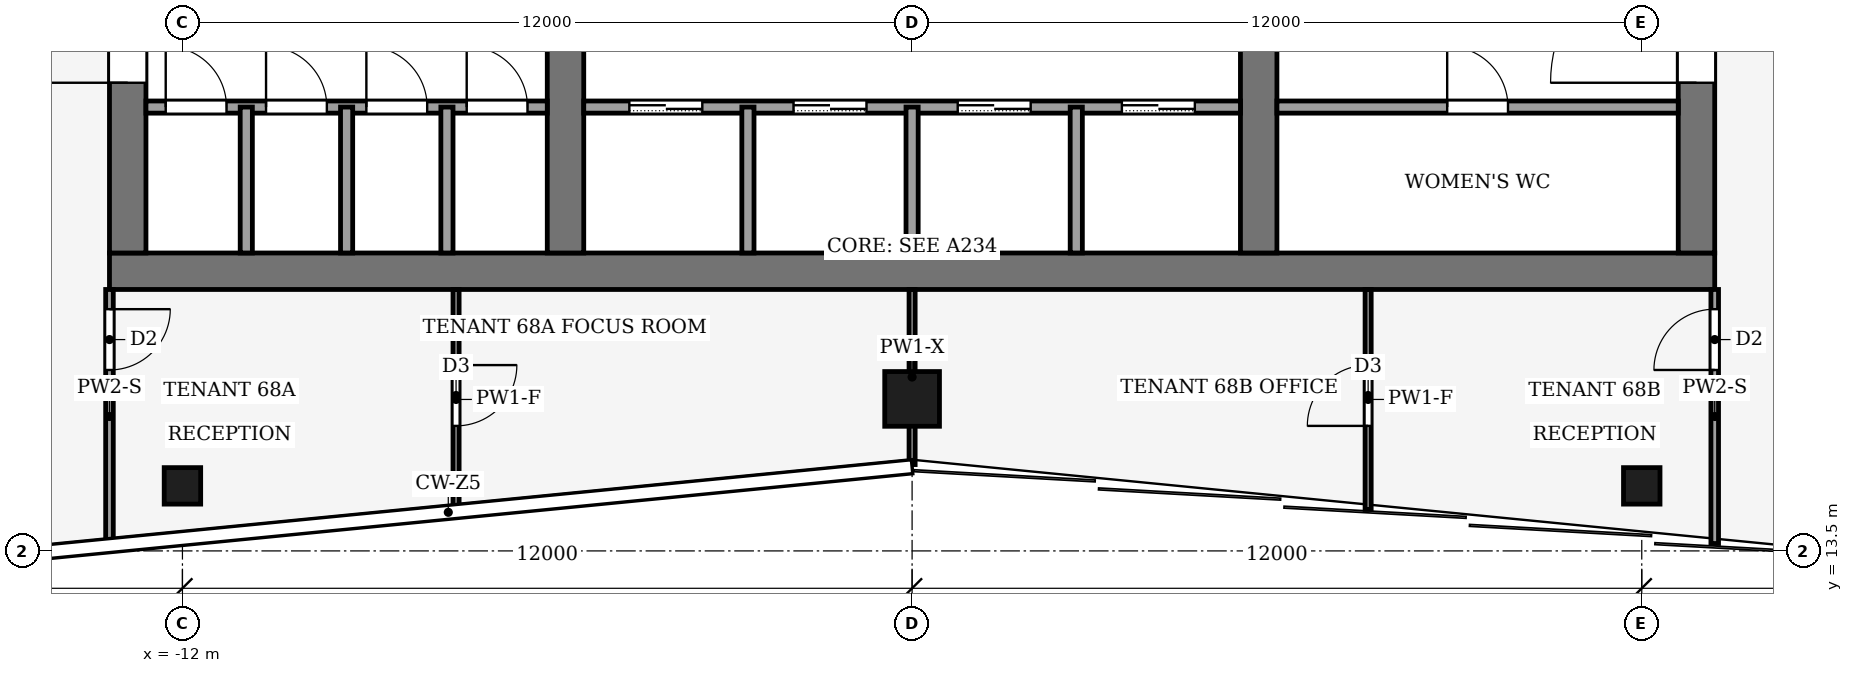
"""IFC4 building model, lengths in metres.
Left out: names, types, materials, properties, quantities, classifications, styles, units other than length and angle.
Written with IfcOpenShell. Run it as: python <this file> out.ifc"""

import sys

from ifc_helpers import new_model, si_unit, direction, frame, frame_2d, origin, origin_2d, place, context, subcontext, project, spatial, rectangle, hollow_rectangle, extrude, element, fill, save


model = new_model("IFC4")
c1 = context("Model", 3, precision=1e-05, world=origin(), true_north=direction((0.0, 1.0)))
c2 = subcontext(c1, "Body", "Model", "MODEL_VIEW")
j1 = project(units=[si_unit("LENGTHUNIT", "METRE"), si_unit("PLANEANGLEUNIT", "RADIAN")], contexts=[c1])
p1 = place(None, origin())
s1 = spatial("IfcSite", under=j1, at=p1, CompositionType="ELEMENT")
p2 = place(p1, origin())
s2 = spatial("IfcBuilding", under=s1, at=p2, CompositionType="ELEMENT")
p3 = place(p2, frame((0.0, 0.0, 298.0)))
s3 = spatial("IfcBuildingStorey", under=s2, at=p3, CompositionType="ELEMENT", Elevation=298.0)
p4 = place(p3, frame((-13.2, 18.1, -0.13), z_axis=(0.0, 0.0, 1.0), x_axis=(1.0, 0.0, 0.0)))
e1 = element("IfcWall", 1, at=p4, inside=s3, PredefinedType="SHEAR", context=c2, shape_type="SweptSolid", body=[
    extrude(rectangle(XDim=26.4, YDim=0.6, at=frame_2d((13.2, 0.0))), origin(), (0.0, 0.0, 1.0), 4.0),
])
p5 = place(p3, frame((-12.9, 18.4, -0.13), z_axis=(0.0, 0.0, 1.0), x_axis=(0.0, 1.0, 0.0)))
e2 = element("IfcWall", 2, at=p5, inside=s3, PredefinedType="SHEAR", context=c2, shape_type="SweptSolid", body=[
    extrude(rectangle(XDim=19.2, YDim=0.6, at=frame_2d((9.6, 0.0))), origin(), (0.0, 0.0, 1.0), 4.0),
])
p6 = place(p5, frame((2.8, 0.0, 0.13)))
e3 = element("IfcOpeningElement", 3, at=p6, cuts=e2, PredefinedType="OPENING", context=c2, shape_type="SweptSolid", body=[
    extrude(rectangle(XDim=2.4, YDim=2.4, at=frame_2d((1.2, 1.2))), frame((0.0, 0.31, 0.0), z_axis=(0.0, -1.0, 0.0), x_axis=(1.0, 0.0, 0.0)), (0.0, 0.0, 1.0), 0.62),
])
p7 = place(p5, frame((13.4, 0.0, 0.13)))
e4 = element("IfcOpeningElement", 4, at=p7, cuts=e2, PredefinedType="OPENING", context=c2, shape_type="SweptSolid", body=[
    extrude(rectangle(XDim=1.4, YDim=2.2, at=frame_2d((0.7, 1.1))), frame((0.0, 0.31, 0.0), z_axis=(0.0, -1.0, 0.0), x_axis=(1.0, 0.0, 0.0)), (0.0, 0.0, 1.0), 0.62),
])
p8 = place(p3, frame((12.9, 18.4, -0.13), z_axis=(0.0, 0.0, 1.0), x_axis=(0.0, 1.0, 0.0)))
e5 = element("IfcWall", 5, at=p8, inside=s3, PredefinedType="SHEAR", context=c2, shape_type="SweptSolid", body=[
    extrude(rectangle(XDim=19.2, YDim=0.6, at=frame_2d((9.6, 0.0))), origin(), (0.0, 0.0, 1.0), 4.0),
])
p9 = place(p8, frame((2.8, 0.0, 0.13)))
e6 = element("IfcOpeningElement", 6, at=p9, cuts=e5, PredefinedType="OPENING", context=c2, shape_type="SweptSolid", body=[
    extrude(rectangle(XDim=2.4, YDim=2.4, at=frame_2d((1.2, 1.2))), frame((0.0, 0.31, 0.0), z_axis=(0.0, -1.0, 0.0), x_axis=(1.0, 0.0, 0.0)), (0.0, 0.0, 1.0), 0.62),
])
p10 = place(p8, frame((13.3, 0.0, 0.13)))
e7 = element("IfcOpeningElement", 7, at=p10, cuts=e5, PredefinedType="OPENING", context=c2, shape_type="SweptSolid", body=[
    extrude(rectangle(XDim=2.4, YDim=2.4, at=frame_2d((1.2, 1.2))), frame((0.0, 0.31, 0.0), z_axis=(0.0, -1.0, 0.0), x_axis=(1.0, 0.0, 0.0)), (0.0, 0.0, 1.0), 0.62),
])
p11 = place(p3, frame((-5.7, 18.4, -0.13), z_axis=(0.0, 0.0, 1.0), x_axis=(0.0, 1.0, 0.0)))
e8 = element("IfcWall", 8, at=p11, inside=s3, PredefinedType="SHEAR", context=c2, shape_type="SweptSolid", body=[
    extrude(rectangle(XDim=19.2, YDim=0.6, at=frame_2d((9.6, 0.0))), origin(), (0.0, 0.0, 1.0), 4.0),
])
p12 = place(p11, frame((8.35, 0.0, 0.13)))
e9 = element("IfcOpeningElement", 9, at=p12, cuts=e8, PredefinedType="OPENING", context=c2, shape_type="SweptSolid", body=[
    extrude(rectangle(XDim=0.9, YDim=2.1, at=frame_2d((0.45, 1.05))), frame((0.0, 0.31, 0.0), z_axis=(0.0, -1.0, 0.0), x_axis=(1.0, 0.0, 0.0)), (0.0, 0.0, 1.0), 0.62),
])
p13 = place(p3, frame((5.7, 18.4, -0.13), z_axis=(0.0, 0.0, 1.0), x_axis=(0.0, 1.0, 0.0)))
e10 = element("IfcWall", 10, at=p13, inside=s3, PredefinedType="SHEAR", context=c2, shape_type="SweptSolid", body=[
    extrude(rectangle(XDim=19.2, YDim=0.6, at=frame_2d((9.6, 0.0))), origin(), (0.0, 0.0, 1.0), 4.0),
])
p14 = place(p13, frame((8.35, 0.0, 0.13)))
e11 = element("IfcOpeningElement", 11, at=p14, cuts=e10, PredefinedType="OPENING", context=c2, shape_type="SweptSolid", body=[
    extrude(rectangle(XDim=0.9, YDim=2.1, at=frame_2d((0.45, 1.05))), frame((0.0, 0.31, 0.0), z_axis=(0.0, -1.0, 0.0), x_axis=(1.0, 0.0, 0.0)), (0.0, 0.0, 1.0), 0.62),
])
p15 = place(p13, frame((13.3, 0.0, 0.13)))
e12 = element("IfcOpeningElement", 12, at=p15, cuts=e10, PredefinedType="OPENING", context=c2, shape_type="SweptSolid", body=[
    extrude(rectangle(XDim=2.4, YDim=2.4, at=frame_2d((1.2, 1.2))), frame((0.0, 0.31, 0.0), z_axis=(0.0, -1.0, 0.0), x_axis=(1.0, 0.0, 0.0)), (0.0, 0.0, 1.0), 0.62),
])
p16 = place(p3, frame((0.0, 16.0, 0.0), z_axis=(0.0, 0.0, 1.0), x_axis=(1.0, 0.0, 0.0)))
e13 = element("IfcColumn", 13, at=p16, inside=s3, PredefinedType="COLUMN", context=c2, shape_type="SweptSolid", body=[
    extrude(hollow_rectangle(XDim=0.9, YDim=0.9, WallThickness=0.04, at=origin_2d()), origin(), (0.0, 0.0, 1.0), 4.0),
])
for number, where, z_axis, x_axis in (
    (14, (-12.0, 14.57, 0.0), (0.0, 0.0, 1.0), (1.0, 0.0, 0.0)),
    (15, (12.0, 14.57, 0.0), (0.0, 0.0, 1.0), (1.0, 0.0, 0.0)),
):
    element("IfcColumn", number, at=place(p3, frame(where, z_axis=z_axis, x_axis=x_axis)), inside=s3, PredefinedType="COLUMN", context=c2, shape_type="SweptSolid", body=[
        extrude(hollow_rectangle(XDim=0.6, YDim=0.6, WallThickness=0.025, at=origin_2d()), origin(), (0.0, 0.0, 1.0), 4.0),
    ])
p17 = place(p3, frame((-12.6, 20.8, 0.0), z_axis=(0.0, 0.0, 1.0), x_axis=(1.0, 0.0, 0.0)))
e16 = element("IfcWall", 16, at=p17, inside=s3, PredefinedType="PARTITIONING", context=c2, shape_type="SweptSolid", body=[
    extrude(rectangle(XDim=6.6, YDim=0.2, at=frame_2d((3.3, 0.0))), origin(), (0.0, 0.0, 1.0), 3.87),
])
p18 = place(p17, frame((0.325, 0.0, 0.0)))
e17 = element("IfcOpeningElement", 17, at=p18, cuts=e16, PredefinedType="OPENING", context=c2, shape_type="SweptSolid", body=[
    extrude(rectangle(XDim=1.0, YDim=2.1, at=frame_2d((0.5, 1.05))), frame((0.0, 0.11, 0.0), z_axis=(0.0, -1.0, 0.0), x_axis=(1.0, 0.0, 0.0)), (0.0, 0.0, 1.0), 0.22),
])
p19 = place(p17, frame((1.975, 0.0, 0.0)))
e18 = element("IfcOpeningElement", 18, at=p19, cuts=e16, PredefinedType="OPENING", context=c2, shape_type="SweptSolid", body=[
    extrude(rectangle(XDim=1.0, YDim=2.1, at=frame_2d((0.5, 1.05))), frame((0.0, 0.11, 0.0), z_axis=(0.0, -1.0, 0.0), x_axis=(1.0, 0.0, 0.0)), (0.0, 0.0, 1.0), 0.22),
])
p20 = place(p17, frame((3.625, 0.0, 0.0)))
e19 = element("IfcOpeningElement", 19, at=p20, cuts=e16, PredefinedType="OPENING", context=c2, shape_type="SweptSolid", body=[
    extrude(rectangle(XDim=1.0, YDim=2.1, at=frame_2d((0.5, 1.05))), frame((0.0, 0.11, 0.0), z_axis=(0.0, -1.0, 0.0), x_axis=(1.0, 0.0, 0.0)), (0.0, 0.0, 1.0), 0.22),
])
p21 = place(p17, frame((5.275, 0.0, 0.0)))
e20 = element("IfcOpeningElement", 20, at=p21, cuts=e16, PredefinedType="OPENING", context=c2, shape_type="SweptSolid", body=[
    extrude(rectangle(XDim=1.0, YDim=2.1, at=frame_2d((0.5, 1.05))), frame((0.0, 0.11, 0.0), z_axis=(0.0, -1.0, 0.0), x_axis=(1.0, 0.0, 0.0)), (0.0, 0.0, 1.0), 0.22),
])
p22 = place(p3, frame((-5.4, 20.8, 0.0), z_axis=(0.0, 0.0, 1.0), x_axis=(1.0, 0.0, 0.0)))
e21 = element("IfcWall", 21, at=p22, inside=s3, PredefinedType="PARTITIONING", context=c2, shape_type="SweptSolid", body=[
    extrude(rectangle(XDim=10.8, YDim=0.2, at=frame_2d((5.4, 0.0))), origin(), (0.0, 0.0, 1.0), 3.87),
])
p23 = place(p22, frame((0.75, 0.0, 0.0)))
e22 = element("IfcOpeningElement", 22, at=p23, cuts=e21, PredefinedType="OPENING", context=c2, shape_type="SweptSolid", body=[
    extrude(rectangle(XDim=1.2, YDim=2.2, at=frame_2d((0.6, 1.1))), frame((0.0, 0.11, 0.0), z_axis=(0.0, -1.0, 0.0), x_axis=(1.0, 0.0, 0.0)), (0.0, 0.0, 1.0), 0.22),
])
p24 = place(p22, frame((3.45, 0.0, 0.0)))
e23 = element("IfcOpeningElement", 23, at=p24, cuts=e21, PredefinedType="OPENING", context=c2, shape_type="SweptSolid", body=[
    extrude(rectangle(XDim=1.2, YDim=2.2, at=frame_2d((0.6, 1.1))), frame((0.0, 0.11, 0.0), z_axis=(0.0, -1.0, 0.0), x_axis=(1.0, 0.0, 0.0)), (0.0, 0.0, 1.0), 0.22),
])
p25 = place(p22, frame((6.15, 0.0, 0.0)))
e24 = element("IfcOpeningElement", 24, at=p25, cuts=e21, PredefinedType="OPENING", context=c2, shape_type="SweptSolid", body=[
    extrude(rectangle(XDim=1.2, YDim=2.2, at=frame_2d((0.6, 1.1))), frame((0.0, 0.11, 0.0), z_axis=(0.0, -1.0, 0.0), x_axis=(1.0, 0.0, 0.0)), (0.0, 0.0, 1.0), 0.22),
])
p26 = place(p22, frame((8.85, 0.0, 0.0)))
e25 = element("IfcOpeningElement", 25, at=p26, cuts=e21, PredefinedType="OPENING", context=c2, shape_type="SweptSolid", body=[
    extrude(rectangle(XDim=1.2, YDim=2.2, at=frame_2d((0.6, 1.1))), frame((0.0, 0.11, 0.0), z_axis=(0.0, -1.0, 0.0), x_axis=(1.0, 0.0, 0.0)), (0.0, 0.0, 1.0), 0.22),
])
p27 = place(p3, frame((6.0, 20.8, 0.0), z_axis=(0.0, 0.0, 1.0), x_axis=(1.0, 0.0, 0.0)))
e26 = element("IfcWall", 26, at=p27, inside=s3, PredefinedType="PARTITIONING", context=c2, shape_type="SweptSolid", body=[
    extrude(rectangle(XDim=6.6, YDim=0.2, at=frame_2d((3.3, 0.0))), origin(), (0.0, 0.0, 1.0), 3.87),
])
p28 = place(p27, frame((2.8, 0.0, 0.0)))
e27 = element("IfcOpeningElement", 27, at=p28, cuts=e26, PredefinedType="OPENING", context=c2, shape_type="SweptSolid", body=[
    extrude(rectangle(XDim=1.0, YDim=2.1, at=frame_2d((0.5, 1.05))), frame((0.0, 0.11, 0.0), z_axis=(0.0, -1.0, 0.0), x_axis=(1.0, 0.0, 0.0)), (0.0, 0.0, 1.0), 0.22),
])
for number, where, z_axis, x_axis in (
    (28, (-10.95, 18.4, 0.0), (0.0, 0.0, 1.0), (0.0, 1.0, 0.0)),
    (29, (-9.3, 18.4, 0.0), (0.0, 0.0, 1.0), (0.0, 1.0, 0.0)),
    (30, (-7.65, 18.4, 0.0), (0.0, 0.0, 1.0), (0.0, 1.0, 0.0)),
    (31, (-2.7, 18.4, 0.0), (0.0, 0.0, 1.0), (0.0, 1.0, 0.0)),
    (32, (0.0, 18.4, 0.0), (0.0, 0.0, 1.0), (0.0, 1.0, 0.0)),
    (33, (2.7, 18.4, 0.0), (0.0, 0.0, 1.0), (0.0, 1.0, 0.0)),
):
    element("IfcWall", number, at=place(p3, frame(where, z_axis=z_axis, x_axis=x_axis)), inside=s3, PredefinedType="PARTITIONING", context=c2, shape_type="SweptSolid", body=[
        extrude(rectangle(XDim=2.4, YDim=0.2, at=frame_2d((1.2, 0.0))), origin(), (0.0, 0.0, 1.0), 3.87),
    ])
p29 = place(p3, frame((-13.2, 17.8, 0.0), z_axis=(0.0, 0.0, 1.0), x_axis=(0.0, -1.0, 0.0)))
e34 = element("IfcWall", 34, at=p29, inside=s3, PredefinedType="PARTITIONING", context=c2, shape_type="SweptSolid", body=[
    extrude(rectangle(XDim=4.178, YDim=0.125, at=frame_2d((2.089, 0.0))), origin(), (0.0, 0.0, 1.0), 3.04),
])
p30 = place(p29, frame((0.324, 0.0, 0.0)))
e35 = element("IfcOpeningElement", 35, at=p30, cuts=e34, PredefinedType="OPENING", context=c2, shape_type="SweptSolid", body=[
    extrude(rectangle(XDim=1.0, YDim=2.1, at=frame_2d((0.5, 1.05))), frame((0.0, 0.073, 0.0), z_axis=(0.0, -1.0, 0.0), x_axis=(1.0, 0.0, 0.0)), (0.0, 0.0, 1.0), 0.145),
])
p31 = place(p3, frame((13.2, 13.622, 0.0), z_axis=(0.0, 0.0, 1.0), x_axis=(0.0, 1.0, 0.0)))
e36 = element("IfcWall", 36, at=p31, inside=s3, PredefinedType="PARTITIONING", context=c2, shape_type="SweptSolid", body=[
    extrude(rectangle(XDim=4.178, YDim=0.125, at=frame_2d((2.089, 0.0))), origin(), (0.0, 0.0, 1.0), 3.04),
])
p32 = place(p31, frame((2.854, 0.0, 0.0)))
e37 = element("IfcOpeningElement", 37, at=p32, cuts=e36, PredefinedType="OPENING", context=c2, shape_type="SweptSolid", body=[
    extrude(rectangle(XDim=1.0, YDim=2.1, at=frame_2d((0.5, 1.05))), frame((0.0, 0.073, 0.0), z_axis=(0.0, -1.0, 0.0), x_axis=(1.0, 0.0, 0.0)), (0.0, 0.0, 1.0), 0.145),
])
p33 = place(p3, frame((-7.5, 17.8, 0.0), z_axis=(0.0, 0.0, 1.0), x_axis=(0.0, -1.0, 0.0)))
e38 = element("IfcWall", 38, at=p33, inside=s3, PredefinedType="PARTITIONING", context=c2, shape_type="SweptSolid", body=[
    extrude(rectangle(XDim=3.618, YDim=0.1, at=frame_2d((1.809, 0.0))), origin(), (0.0, 0.0, 1.0), 3.04),
])
p34 = place(p33, frame((1.244, 0.0, 0.0)))
e39 = element("IfcOpeningElement", 39, at=p34, cuts=e38, PredefinedType="OPENING", context=c2, shape_type="SweptSolid", body=[
    extrude(rectangle(XDim=1.0, YDim=2.1, at=frame_2d((0.5, 1.05))), frame((0.0, 0.06, 0.0), z_axis=(0.0, -1.0, 0.0), x_axis=(1.0, 0.0, 0.0)), (0.0, 0.0, 1.0), 0.12),
])
p35 = place(p3, frame((0.0, 14.92, 0.0), z_axis=(0.0, 0.0, 1.0), x_axis=(0.0, 1.0, 0.0)))
e40 = element("IfcWall", 40, at=p35, inside=s3, PredefinedType="PARTITIONING", context=c2, shape_type="SweptSolid", body=[
    extrude(rectangle(XDim=2.88, YDim=0.1, at=frame_2d((1.44, 0.0))), origin(), (0.0, 0.0, 1.0), 3.54),
])
p36 = place(p3, frame((7.5, 14.182, 0.0), z_axis=(0.0, 0.0, 1.0), x_axis=(0.0, 1.0, 0.0)))
e41 = element("IfcWall", 41, at=p36, inside=s3, PredefinedType="PARTITIONING", context=c2, shape_type="SweptSolid", body=[
    extrude(rectangle(XDim=3.618, YDim=0.1, at=frame_2d((1.809, 0.0))), origin(), (0.0, 0.0, 1.0), 3.04),
])
p37 = place(p36, frame((1.374, 0.0, 0.0)))
e42 = element("IfcOpeningElement", 42, at=p37, cuts=e41, PredefinedType="OPENING", context=c2, shape_type="SweptSolid", body=[
    extrude(rectangle(XDim=1.0, YDim=2.1, at=frame_2d((0.5, 1.05))), frame((0.0, 0.06, 0.0), z_axis=(0.0, -1.0, 0.0), x_axis=(1.0, 0.0, 0.0)), (0.0, 0.0, 1.0), 0.12),
])
p38 = place(p23, origin())
e43 = element("IfcDoor", 43, at=p38, inside=s3, OperationType="SLIDING_TO_LEFT", PredefinedType="DOOR", context=c2, shape_type="SweptSolid", body=[
    extrude(rectangle(XDim=1.2, YDim=2.2, at=frame_2d((0.6, 1.1))), frame((0.0, 0.025, 0.0), z_axis=(0.0, -1.0, 0.0), x_axis=(1.0, 0.0, 0.0)), (0.0, 0.0, 1.0), 0.05),
])
fill(e22, e43)
p39 = place(p24, origin())
e44 = element("IfcDoor", 44, at=p39, inside=s3, OperationType="SLIDING_TO_LEFT", PredefinedType="DOOR", context=c2, shape_type="SweptSolid", body=[
    extrude(rectangle(XDim=1.2, YDim=2.2, at=frame_2d((0.6, 1.1))), frame((0.0, 0.025, 0.0), z_axis=(0.0, -1.0, 0.0), x_axis=(1.0, 0.0, 0.0)), (0.0, 0.0, 1.0), 0.05),
])
fill(e23, e44)
p40 = place(p25, origin())
e45 = element("IfcDoor", 45, at=p40, inside=s3, OperationType="SLIDING_TO_LEFT", PredefinedType="DOOR", context=c2, shape_type="SweptSolid", body=[
    extrude(rectangle(XDim=1.2, YDim=2.2, at=frame_2d((0.6, 1.1))), frame((0.0, 0.025, 0.0), z_axis=(0.0, -1.0, 0.0), x_axis=(1.0, 0.0, 0.0)), (0.0, 0.0, 1.0), 0.05),
])
fill(e24, e45)
p41 = place(p26, origin())
e46 = element("IfcDoor", 46, at=p41, inside=s3, OperationType="SLIDING_TO_LEFT", PredefinedType="DOOR", context=c2, shape_type="SweptSolid", body=[
    extrude(rectangle(XDim=1.2, YDim=2.2, at=frame_2d((0.6, 1.1))), frame((0.0, 0.025, 0.0), z_axis=(0.0, -1.0, 0.0), x_axis=(1.0, 0.0, 0.0)), (0.0, 0.0, 1.0), 0.05),
])
fill(e25, e46)
p42 = place(p18, origin())
e47 = element("IfcDoor", 47, at=p42, inside=s3, OperationType="SINGLE_SWING_RIGHT", PredefinedType="DOOR", context=c2, shape_type="SweptSolid", body=[
    extrude(rectangle(XDim=1.0, YDim=2.1, at=frame_2d((0.5, 1.05))), frame((0.0, 0.025, 0.0), z_axis=(0.0, -1.0, 0.0), x_axis=(1.0, 0.0, 0.0)), (0.0, 0.0, 1.0), 0.05),
])
fill(e17, e47)
p43 = place(p19, origin())
e48 = element("IfcDoor", 48, at=p43, inside=s3, OperationType="SINGLE_SWING_RIGHT", PredefinedType="DOOR", context=c2, shape_type="SweptSolid", body=[
    extrude(rectangle(XDim=1.0, YDim=2.1, at=frame_2d((0.5, 1.05))), frame((0.0, 0.025, 0.0), z_axis=(0.0, -1.0, 0.0), x_axis=(1.0, 0.0, 0.0)), (0.0, 0.0, 1.0), 0.05),
])
fill(e18, e48)
p44 = place(p20, origin())
e49 = element("IfcDoor", 49, at=p44, inside=s3, OperationType="SINGLE_SWING_LEFT", PredefinedType="DOOR", context=c2, shape_type="SweptSolid", body=[
    extrude(rectangle(XDim=1.0, YDim=2.1, at=frame_2d((0.5, 1.05))), frame((0.0, 0.025, 0.0), z_axis=(0.0, -1.0, 0.0), x_axis=(1.0, 0.0, 0.0)), (0.0, 0.0, 1.0), 0.05),
])
fill(e19, e49)
p45 = place(p21, origin())
e50 = element("IfcDoor", 50, at=p45, inside=s3, OperationType="SINGLE_SWING_LEFT", PredefinedType="DOOR", context=c2, shape_type="SweptSolid", body=[
    extrude(rectangle(XDim=1.0, YDim=2.1, at=frame_2d((0.5, 1.05))), frame((0.0, 0.025, 0.0), z_axis=(0.0, -1.0, 0.0), x_axis=(1.0, 0.0, 0.0)), (0.0, 0.0, 1.0), 0.05),
])
fill(e20, e50)
p46 = place(p28, origin())
e51 = element("IfcDoor", 51, at=p46, inside=s3, OperationType="SINGLE_SWING_LEFT", PredefinedType="DOOR", context=c2, shape_type="SweptSolid", body=[
    extrude(rectangle(XDim=1.0, YDim=2.1, at=frame_2d((0.5, 1.05))), frame((0.0, 0.025, 0.0), z_axis=(0.0, -1.0, 0.0), x_axis=(1.0, 0.0, 0.0)), (0.0, 0.0, 1.0), 0.05),
])
fill(e27, e51)
p47 = place(p6, origin())
e52 = element("IfcDoor", 52, at=p47, inside=s3, OperationType="DOUBLE_DOOR_SINGLE_SWING", PredefinedType="DOOR", context=c2, shape_type="SweptSolid", body=[
    extrude(rectangle(XDim=2.4, YDim=2.4, at=frame_2d((1.2, 1.2))), frame((0.0, 0.025, 0.0), z_axis=(0.0, -1.0, 0.0), x_axis=(1.0, 0.0, 0.0)), (0.0, 0.0, 1.0), 0.05),
])
fill(e3, e52)
p48 = place(p9, origin())
e53 = element("IfcDoor", 53, at=p48, inside=s3, OperationType="DOUBLE_DOOR_SINGLE_SWING", PredefinedType="DOOR", context=c2, shape_type="SweptSolid", body=[
    extrude(rectangle(XDim=2.4, YDim=2.4, at=frame_2d((1.2, 1.2))), frame((0.0, 0.025, 0.0), z_axis=(0.0, -1.0, 0.0), x_axis=(1.0, 0.0, 0.0)), (0.0, 0.0, 1.0), 0.05),
])
fill(e6, e53)
p49 = place(p30, origin())
e54 = element("IfcDoor", 54, at=p49, inside=s3, OperationType="SINGLE_SWING_LEFT", PredefinedType="DOOR", context=c2, shape_type="SweptSolid", body=[
    extrude(rectangle(XDim=1.0, YDim=2.1, at=frame_2d((0.5, 1.05))), frame((0.0, 0.025, 0.0), z_axis=(0.0, -1.0, 0.0), x_axis=(1.0, 0.0, 0.0)), (0.0, 0.0, 1.0), 0.05),
])
fill(e35, e54)
p50 = place(p32, origin())
e55 = element("IfcDoor", 55, at=p50, inside=s3, OperationType="SINGLE_SWING_RIGHT", PredefinedType="DOOR", context=c2, shape_type="SweptSolid", body=[
    extrude(rectangle(XDim=1.0, YDim=2.1, at=frame_2d((0.5, 1.05))), frame((0.0, 0.025, 0.0), z_axis=(0.0, -1.0, 0.0), x_axis=(1.0, 0.0, 0.0)), (0.0, 0.0, 1.0), 0.05),
])
fill(e37, e55)
p51 = place(p34, origin())
e56 = element("IfcDoor", 56, at=p51, inside=s3, OperationType="SINGLE_SWING_LEFT", PredefinedType="DOOR", context=c2, shape_type="SweptSolid", body=[
    extrude(rectangle(XDim=1.0, YDim=2.1, at=frame_2d((0.5, 1.05))), frame((0.0, 0.025, 0.0), z_axis=(0.0, -1.0, 0.0), x_axis=(1.0, 0.0, 0.0)), (0.0, 0.0, 1.0), 0.05),
])
fill(e39, e56)
p52 = place(p37, origin())
e57 = element("IfcDoor", 57, at=p52, inside=s3, OperationType="SINGLE_SWING_RIGHT", PredefinedType="DOOR", context=c2, shape_type="SweptSolid", body=[
    extrude(rectangle(XDim=1.0, YDim=2.1, at=frame_2d((0.5, 1.05))), frame((0.0, 0.025, 0.0), z_axis=(0.0, -1.0, 0.0), x_axis=(1.0, 0.0, 0.0)), (0.0, 0.0, 1.0), 0.05),
])
fill(e42, e57)
save(model, sys.argv[1])
